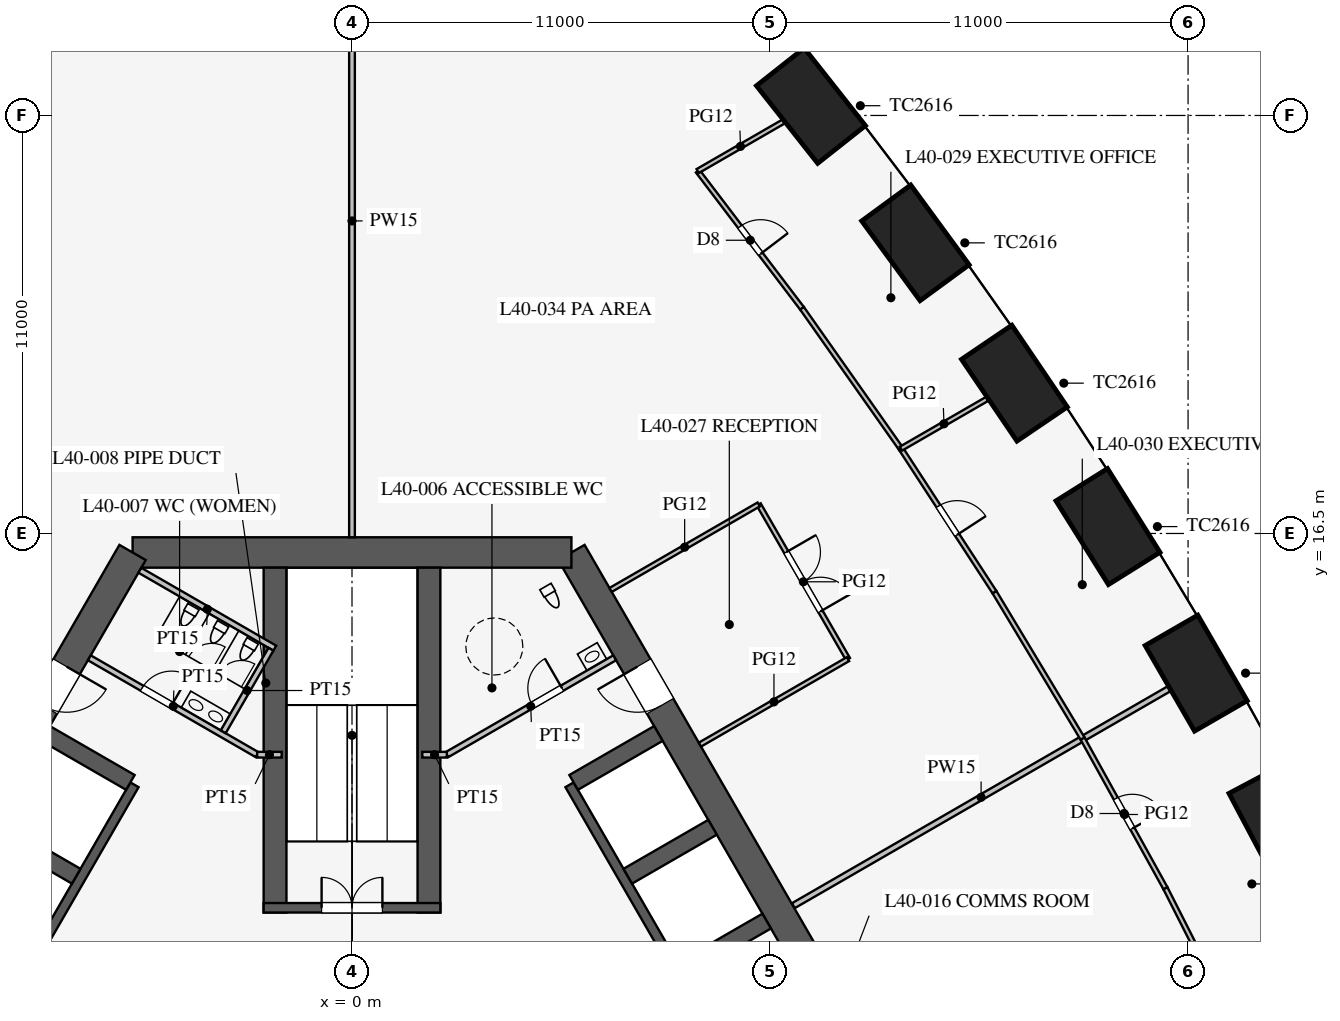
"""IFC4 building model, lengths in metres.
Left out: names, types, materials, properties, quantities, classifications, styles, units other than length and angle.
Written with IfcOpenShell. Run it as: python <this file> out.ifc"""

import sys

from ifc_helpers import new_model, si_unit, direction, frame, frame_2d, origin, origin_2d, place, context, subcontext, project, spatial, rectangle, extrude, element, fill, save


model = new_model("IFC4")
c1 = context("Model", 3, precision=1e-05, world=origin(), true_north=direction((0.0, 1.0)))
c2 = subcontext(c1, "Body", "Model", "MODEL_VIEW")
j1 = project(units=[si_unit("LENGTHUNIT", "METRE"), si_unit("PLANEANGLEUNIT", "RADIAN")], contexts=[c1])
p1 = place(None, origin())
s1 = spatial("IfcSite", under=j1, at=p1, CompositionType="ELEMENT")
p2 = place(p1, origin())
s2 = spatial("IfcBuilding", under=s1, at=p2, CompositionType="ELEMENT")
p3 = place(p2, frame((0.0, 0.0, 174.5)))
s3 = spatial("IfcBuildingStorey", under=s2, at=p3, CompositionType="ELEMENT", Elevation=174.5)
for number, where, z_axis, x_axis in (
    (1, (24.393, 8.887, 0.0), (0.0, 0.0, 1.0), (-0.468, 0.883, 0.0)),
    (2, (22.213, 12.825, 0.0), (0.0, 0.0, 1.0), (-0.5, 0.866, 0.0)),
    (3, (19.893, 16.681, 0.0), (0.0, 0.0, 1.0), (-0.531, 0.847, 0.0)),
    (4, (17.43, 20.456, 0.0), (0.0, 0.0, 1.0), (-0.561, 0.828, 0.0)),
    (5, (14.825, 24.148, 0.0), (0.0, 0.0, 1.0), (-0.591, 0.807, 0.0)),
    (6, (12.077, 27.757, 0.0), (0.0, 0.0, 1.0), (-0.62, 0.785, 0.0)),
):
    element("IfcColumn", number, at=place(p3, frame(where, z_axis=z_axis, x_axis=x_axis)), inside=s3, PredefinedType="COLUMN", context=c2, shape_type="SweptSolid", body=[
        extrude(rectangle(XDim=2.6, YDim=1.6, at=origin_2d()), origin(), (0.0, 0.0, 1.0), 4.2),
    ])
p4 = place(p3, frame((16.743, -3.0, 0.0), z_axis=(0.0, 0.0, 1.0), x_axis=(-0.500002442456, 0.866023993627, 0.0)))
e7 = element("IfcWall", 7, at=p4, inside=s3, PredefinedType="SHEAR", context=c2, shape_type="SweptSolid", body=[
    extrude(rectangle(XDim=21.939, YDim=0.8, at=frame_2d((10.97, 0.0))), origin(), (0.0, 0.0, 1.0), 4.2),
])
p5 = place(p4, frame((17.27, 0.0, 0.0)))
e8 = element("IfcOpeningElement", 8, at=p5, cuts=e7, PredefinedType="OPENING", context=c2, shape_type="SweptSolid", body=[
    extrude(rectangle(XDim=1.2, YDim=2.1, at=frame_2d((0.6, 1.05))), frame((0.0, 0.41, 0.0), z_axis=(0.0, -1.0, 0.0), x_axis=(1.0, 0.0, 0.0)), (0.0, 0.0, 1.0), 0.82),
])
p6 = place(p4, frame((3.47, 0.0, 0.0)))
e9 = element("IfcOpeningElement", 9, at=p6, cuts=e7, PredefinedType="OPENING", context=c2, shape_type="SweptSolid", body=[
    extrude(rectangle(XDim=1.2, YDim=2.1, at=frame_2d((0.6, 1.05))), frame((0.0, 0.41, 0.0), z_axis=(0.0, -1.0, 0.0), x_axis=(1.0, 0.0, 0.0)), (0.0, 0.0, 1.0), 0.82),
])
p7 = place(p3, frame((5.773, 16.0, 0.0), z_axis=(0.0, 0.0, 1.0), x_axis=(-1.0, 0.0, 0.0)))
e10 = element("IfcWall", 10, at=p7, inside=s3, PredefinedType="SHEAR", context=c2, shape_type="SweptSolid", body=[
    extrude(rectangle(XDim=11.547, YDim=0.8, at=frame_2d((5.773, 0.0))), origin(), (0.0, 0.0, 1.0), 4.2),
])
p8 = place(p3, frame((-5.773, 16.0, 0.0), z_axis=(0.0, 0.0, 1.0), x_axis=(-0.500002442456, -0.866023993627, 0.0)))
e11 = element("IfcWall", 11, at=p8, inside=s3, PredefinedType="SHEAR", context=c2, shape_type="SweptSolid", body=[
    extrude(rectangle(XDim=21.939, YDim=0.8, at=frame_2d((10.97, 0.0))), origin(), (0.0, 0.0, 1.0), 4.2),
])
p9 = place(p8, frame((17.27, 0.0, 0.0)))
e12 = element("IfcOpeningElement", 12, at=p9, cuts=e11, PredefinedType="OPENING", context=c2, shape_type="SweptSolid", body=[
    extrude(rectangle(XDim=1.2, YDim=2.1, at=frame_2d((0.6, 1.05))), frame((0.0, 0.41, 0.0), z_axis=(0.0, -1.0, 0.0), x_axis=(1.0, 0.0, 0.0)), (0.0, 0.0, 1.0), 0.82),
])
p10 = place(p8, frame((3.47, 0.0, 0.0)))
e13 = element("IfcOpeningElement", 13, at=p10, cuts=e11, PredefinedType="OPENING", context=c2, shape_type="SweptSolid", body=[
    extrude(rectangle(XDim=1.2, YDim=2.1, at=frame_2d((0.6, 1.05))), frame((0.0, 0.41, 0.0), z_axis=(0.0, -1.0, 0.0), x_axis=(1.0, 0.0, 0.0)), (0.0, 0.0, 1.0), 0.82),
])
p11 = place(p3, frame((11.424, 0.014, 0.0), z_axis=(0.0, 0.0, 1.0), x_axis=(-0.500001763848, 0.866024385424, 0.0)))
e14 = element("IfcWall", 14, at=p11, inside=s3, PredefinedType="SHEAR", context=c2, shape_type="SweptSolid", body=[
    extrude(rectangle(XDim=11.4, YDim=0.25, at=frame_2d((5.7, 0.0))), origin(), (0.0, 0.0, 1.0), 4.2),
])
p12 = place(p11, frame((0.975, 0.0, 0.0)))
e15 = element("IfcOpeningElement", 15, at=p12, cuts=e14, PredefinedType="OPENING", context=c2, shape_type="SweptSolid", body=[
    extrude(rectangle(XDim=0.9, YDim=2.1, at=frame_2d((0.45, 1.05))), frame((0.0, 0.135, 0.0), z_axis=(0.0, -1.0, 0.0), x_axis=(1.0, 0.0, 0.0)), (0.0, 0.0, 1.0), 0.27),
])
p13 = place(p11, frame((3.825, 0.0, 0.0)))
e16 = element("IfcOpeningElement", 16, at=p13, cuts=e14, PredefinedType="OPENING", context=c2, shape_type="SweptSolid", body=[
    extrude(rectangle(XDim=0.9, YDim=2.1, at=frame_2d((0.45, 1.05))), frame((0.0, 0.135, 0.0), z_axis=(0.0, -1.0, 0.0), x_axis=(1.0, 0.0, 0.0)), (0.0, 0.0, 1.0), 0.27),
])
for number, where, z_axis, x_axis in (
    (17, (8.682, 5.012, 0.0), (0.0, 0.0, 1.0), (0.866, 0.5, 0.0)),
    (18, (7.257, 7.481, 0.0), (0.0, 0.0, 1.0), (0.866, 0.5, 0.0)),
):
    element("IfcWall", number, at=place(p3, frame(where, z_axis=z_axis, x_axis=x_axis)), inside=s3, PredefinedType="SHEAR", context=c2, shape_type="SweptSolid", body=[
        extrude(rectangle(XDim=2.575, YDim=0.45, at=frame_2d((1.288, 0.0))), origin(), (0.0, 0.0, 1.0), 4.2),
    ])
p14 = place(p3, frame((5.832, 9.949, 0.0), z_axis=(0.0, 0.0, 1.0), x_axis=(0.866029291668, 0.499993265928, 0.0)))
e19 = element("IfcWall", 19, at=p14, inside=s3, PredefinedType="SHEAR", context=c2, shape_type="SweptSolid", body=[
    extrude(rectangle(XDim=2.575, YDim=0.45, at=frame_2d((1.288, 0.0))), origin(), (0.0, 0.0, 1.0), 4.2),
])
p15 = place(p3, frame((-5.724, 9.886, 0.0), z_axis=(0.0, 0.0, 1.0), x_axis=(-0.500001763848, -0.866024385424, 0.0)))
e20 = element("IfcWall", 20, at=p15, inside=s3, PredefinedType="SHEAR", context=c2, shape_type="SweptSolid", body=[
    extrude(rectangle(XDim=11.4, YDim=0.25, at=frame_2d((5.7, 0.0))), origin(), (0.0, 0.0, 1.0), 4.2),
])
p16 = place(p15, frame((6.525, 0.0, 0.0)))
e21 = element("IfcOpeningElement", 21, at=p16, cuts=e20, PredefinedType="OPENING", context=c2, shape_type="SweptSolid", body=[
    extrude(rectangle(XDim=1.2, YDim=2.2, at=frame_2d((0.6, 1.1))), frame((0.0, 0.135, 0.0), z_axis=(0.0, -1.0, 0.0), x_axis=(1.0, 0.0, 0.0)), (0.0, 0.0, 1.0), 0.27),
])
p17 = place(p15, frame((9.375, 0.0, 0.0)))
e22 = element("IfcOpeningElement", 22, at=p17, cuts=e20, PredefinedType="OPENING", context=c2, shape_type="SweptSolid", body=[
    extrude(rectangle(XDim=1.2, YDim=2.2, at=frame_2d((0.6, 1.1))), frame((0.0, 0.135, 0.0), z_axis=(0.0, -1.0, 0.0), x_axis=(1.0, 0.0, 0.0)), (0.0, 0.0, 1.0), 0.27),
])
p18 = place(p3, frame((-5.832, 9.949, 0.0), z_axis=(0.0, 0.0, 1.0), x_axis=(-0.866029291668, 0.499993265928, 0.0)))
e23 = element("IfcWall", 23, at=p18, inside=s3, PredefinedType="SHEAR", context=c2, shape_type="SweptSolid", body=[
    extrude(rectangle(XDim=2.575, YDim=0.45, at=frame_2d((1.288, 0.0))), origin(), (0.0, 0.0, 1.0), 4.2),
])
p19 = place(p3, frame((-7.257, 7.481, 0.0), z_axis=(0.0, 0.0, 1.0), x_axis=(-0.866046643894, 0.499963209246, 0.0)))
e24 = element("IfcWall", 24, at=p19, inside=s3, PredefinedType="SHEAR", context=c2, shape_type="SweptSolid", body=[
    extrude(rectangle(XDim=2.575, YDim=0.45, at=frame_2d((1.288, 0.0))), origin(), (0.0, 0.0, 1.0), 4.2),
])
for number, where, z_axis, x_axis in (
    (25, (2.025, 6.525, 0.0), (0.0, 0.0, 1.0), (0.0, 1.0, 0.0)),
    (26, (-2.025, 6.525, 0.0), (0.0, 0.0, 1.0), (0.0, 1.0, 0.0)),
):
    element("IfcWall", number, at=place(p3, frame(where, z_axis=z_axis, x_axis=x_axis)), inside=s3, PredefinedType="SHEAR", context=c2, shape_type="SweptSolid", body=[
        extrude(rectangle(XDim=9.075, YDim=0.6, at=frame_2d((4.538, 0.0))), origin(), (0.0, 0.0, 1.0), 4.2),
    ])
p20 = place(p3, frame((2.325, 6.65, 0.0), z_axis=(0.0, 0.0, 1.0), x_axis=(-1.0, 0.0, 0.0)))
e27 = element("IfcWall", 27, at=p20, inside=s3, PredefinedType="SHEAR", context=c2, shape_type="SweptSolid", body=[
    extrude(rectangle(XDim=4.65, YDim=0.25, at=frame_2d((2.325, 0.0))), origin(), (0.0, 0.0, 1.0), 4.2),
])
p21 = place(p20, frame((1.525, 0.0, 0.0)))
e28 = element("IfcOpeningElement", 28, at=p21, cuts=e27, PredefinedType="OPENING", context=c2, shape_type="SweptSolid", body=[
    extrude(rectangle(XDim=1.6, YDim=2.1, at=frame_2d((0.8, 1.05))), frame((0.0, 0.135, 0.0), z_axis=(0.0, -1.0, 0.0), x_axis=(1.0, 0.0, 0.0)), (0.0, 0.0, 1.0), 0.27),
])
p22 = place(p3, frame((2.495, 10.678, 0.0), z_axis=(0.0, 0.0, 1.0), x_axis=(0.86602216432, 0.500005610874, 0.0)))
e29 = element("IfcWall", 29, at=p22, inside=s3, PredefinedType="PARTITIONING", context=c2, shape_type="SweptSolid", body=[
    extrude(rectangle(XDim=5.1, YDim=0.15, at=frame_2d((2.55, 0.0))), origin(), (0.0, 0.0, 1.0), 3.95),
])
p23 = place(p22, frame((2.6, 0.0, 0.0)))
e30 = element("IfcOpeningElement", 30, at=p23, cuts=e29, PredefinedType="OPENING", context=c2, shape_type="SweptSolid", body=[
    extrude(rectangle(XDim=0.9, YDim=2.1, at=frame_2d((0.45, 1.05))), frame((0.0, 0.085, 0.0), z_axis=(0.0, -1.0, 0.0), x_axis=(1.0, 0.0, 0.0)), (0.0, 0.0, 1.0), 0.17),
])
p24 = place(p3, frame((-2.495, 10.678, 0.0), z_axis=(0.0, 0.0, 1.0), x_axis=(-0.86602216432, 0.500005610874, 0.0)))
e31 = element("IfcWall", 31, at=p24, inside=s3, PredefinedType="PARTITIONING", context=c2, shape_type="SweptSolid", body=[
    extrude(rectangle(XDim=5.1, YDim=0.15, at=frame_2d((2.55, 0.0))), origin(), (0.0, 0.0, 1.0), 3.95),
])
p25 = place(p24, frame((2.6, 0.0, 0.0)))
e32 = element("IfcOpeningElement", 32, at=p25, cuts=e31, PredefinedType="OPENING", context=c2, shape_type="SweptSolid", body=[
    extrude(rectangle(XDim=0.9, YDim=2.1, at=frame_2d((0.45, 1.05))), frame((0.0, 0.085, 0.0), z_axis=(0.0, -1.0, 0.0), x_axis=(1.0, 0.0, 0.0)), (0.0, 0.0, 1.0), 0.17),
])
for number, where, z_axis, x_axis in (
    (33, (2.495, 10.678, 0.0), (0.0, 0.0, 1.0), (-1.0, 0.0, 0.0)),
    (34, (-2.495, 10.678, 0.0), (0.0, 0.0, 1.0), (1.0, 0.0, 0.0)),
):
    element("IfcWall", number, at=place(p3, frame(where, z_axis=z_axis, x_axis=x_axis)), inside=s3, PredefinedType="PARTITIONING", context=c2, shape_type="SweptSolid", body=[
        extrude(rectangle(XDim=0.645, YDim=0.15, at=frame_2d((0.323, 0.0))), origin(), (0.0, 0.0, 1.0), 3.95),
    ])
p26 = place(p3, frame((-2.031, 13.482, 0.0), z_axis=(0.0, 0.0, 1.0), x_axis=(-0.866050731258, 0.499956128963, 0.0)))
e35 = element("IfcWall", 35, at=p26, inside=s3, PredefinedType="PARTITIONING", context=c2, shape_type="SweptSolid", body=[
    extrude(rectangle(XDim=4.1, YDim=0.15, at=frame_2d((2.05, 0.0))), origin(), (0.0, 0.0, 1.0), 3.95),
])
p27 = place(p3, frame((-3.389, 11.281, 0.0), z_axis=(0.0, 0.0, 1.0), x_axis=(0.499989096993, 0.866031698547, 0.0)))
e36 = element("IfcWall", 36, at=p27, inside=s3, PredefinedType="PARTITIONING", context=c2, shape_type="SweptSolid", body=[
    extrude(rectangle(XDim=2.51, YDim=0.15, at=frame_2d((1.255, 0.0))), origin(), (0.0, 0.0, 1.0), 3.95),
])
p28 = place(p3, frame((0.0, 16.4, 0.0), z_axis=(0.0, 0.0, 1.0), x_axis=(0.0, 1.0, 0.0)))
e37 = element("IfcWall", 37, at=p28, inside=s3, PredefinedType="PARTITIONING", context=c2, shape_type="SweptSolid", body=[
    extrude(rectangle(XDim=16.65, YDim=0.15, at=frame_2d((8.325, 0.0))), origin(), (0.0, 0.0, 1.0), 1.95),
])
p29 = place(p3, frame((11.613, 6.705, 0.0), z_axis=(0.0, 0.0, 1.0), x_axis=(0.866026306654, 0.499998436182, 0.0)))
e38 = element("IfcWall", 38, at=p29, inside=s3, PredefinedType="PARTITIONING", context=c2, shape_type="SweptSolid", body=[
    extrude(rectangle(XDim=11.41, YDim=0.15, at=frame_2d((5.705, 0.0))), origin(), (0.0, 0.0, 1.0), 2.15),
])
p30 = place(p3, frame((13.052, 13.194, 0.0), z_axis=(0.0, 0.0, 1.0), x_axis=(-0.499977259774, 0.866038532462, 0.0)))
e39 = element("IfcWall", 39, at=p30, inside=s3, PredefinedType="PARTITIONING", context=c2, shape_type="SweptSolid", body=[
    extrude(rectangle(XDim=4.7, YDim=0.12, at=frame_2d((2.35, 0.0))), origin(), (0.0, 0.0, 1.0), 2.9),
])
p31 = place(p30, frame((1.45, 0.0, 0.15)))
e40 = element("IfcOpeningElement", 40, at=p31, cuts=e39, PredefinedType="OPENING", context=c2, shape_type="SweptSolid", body=[
    extrude(rectangle(XDim=1.8, YDim=2.1, at=frame_2d((0.9, 1.05))), frame((0.0, 0.07, 0.0), z_axis=(0.0, -1.0, 0.0), x_axis=(1.0, 0.0, 0.0)), (0.0, 0.0, 1.0), 0.14),
])
p32 = place(p3, frame((9.155, 10.944, 0.0), z_axis=(0.0, 0.0, 1.0), x_axis=(0.866017533419, 0.500013631625, 0.0)))
e41 = element("IfcWall", 41, at=p32, inside=s3, PredefinedType="PARTITIONING", context=c2, shape_type="SweptSolid", body=[
    extrude(rectangle(XDim=4.5, YDim=0.12, at=frame_2d((2.25, 0.0))), origin(), (0.0, 0.0, 1.0), 2.9),
])
p33 = place(p3, frame((6.805, 15.014, 0.0), z_axis=(0.0, 0.0, 1.0), x_axis=(0.866031096941, 0.499990139034, 0.0)))
e42 = element("IfcWall", 42, at=p33, inside=s3, PredefinedType="PARTITIONING", context=c2, shape_type="SweptSolid", body=[
    extrude(rectangle(XDim=4.5, YDim=0.12, at=frame_2d((2.25, 0.0))), origin(), (0.0, 0.0, 1.0), 2.9),
])
p34 = place(p3, frame((19.226, 11.1, 0.0), z_axis=(0.0, 0.0, 1.0), x_axis=(-0.515548366618, 0.856860479703, 0.0)))
e43 = element("IfcWall", 43, at=p34, inside=s3, PredefinedType="PARTITIONING", context=c2, shape_type="SweptSolid", body=[
    extrude(rectangle(XDim=4.501, YDim=0.12, at=frame_2d((2.25, 0.0))), origin(), (0.0, 0.0, 1.0), 2.9),
])
p35 = place(p3, frame((11.842, 22.425, 0.0), z_axis=(0.0, 0.0, 1.0), x_axis=(-0.605240194184, 0.796042905467, 0.0)))
e44 = element("IfcWall", 44, at=p35, inside=s3, PredefinedType="PARTITIONING", context=c2, shape_type="SweptSolid", body=[
    extrude(rectangle(XDim=4.536, YDim=0.12, at=frame_2d((2.268, 0.0))), origin(), (0.0, 0.0, 1.0), 2.9),
])
p36 = place(p35, frame((1.8, 0.0, 0.15)))
e45 = element("IfcOpeningElement", 45, at=p36, cuts=e44, PredefinedType="OPENING", context=c2, shape_type="SweptSolid", body=[
    extrude(rectangle(XDim=0.9, YDim=2.1, at=frame_2d((0.45, 1.05))), frame((0.0, 0.07, 0.0), z_axis=(0.0, -1.0, 0.0), x_axis=(1.0, 0.0, 0.0)), (0.0, 0.0, 1.0), 0.14),
])
p37 = place(p3, frame((16.905, 14.956, 0.0), z_axis=(0.0, 0.0, 1.0), x_axis=(-0.546069464151, 0.837739900161, 0.0)))
e46 = element("IfcWall", 46, at=p37, inside=s3, PredefinedType="PARTITIONING", context=c2, shape_type="SweptSolid", body=[
    extrude(rectangle(XDim=4.507, YDim=0.12, at=frame_2d((2.253, 0.0))), origin(), (0.0, 0.0, 1.0), 2.9),
])
p38 = place(p37, frame((1.8, 0.0, 0.15)))
e47 = element("IfcOpeningElement", 47, at=p38, cuts=e46, PredefinedType="OPENING", context=c2, shape_type="SweptSolid", body=[
    extrude(rectangle(XDim=0.9, YDim=2.1, at=frame_2d((0.45, 1.05))), frame((0.0, 0.07, 0.0), z_axis=(0.0, -1.0, 0.0), x_axis=(1.0, 0.0, 0.0)), (0.0, 0.0, 1.0), 0.14),
])
p39 = place(p3, frame((14.444, 18.732, 0.0), z_axis=(0.0, 0.0, 1.0), x_axis=(-0.576023283708, 0.817433285734, 0.0)))
e48 = element("IfcWall", 48, at=p39, inside=s3, PredefinedType="PARTITIONING", context=c2, shape_type="SweptSolid", body=[
    extrude(rectangle(XDim=4.519, YDim=0.12, at=frame_2d((2.259, 0.0))), origin(), (0.0, 0.0, 1.0), 2.9),
])
p40 = place(p3, frame((21.405, 7.162, 0.0), z_axis=(0.0, 0.0, 1.0), x_axis=(-0.484292898211, 0.874905931368, 0.0)))
e49 = element("IfcWall", 49, at=p40, inside=s3, PredefinedType="PARTITIONING", context=c2, shape_type="SweptSolid", body=[
    extrude(rectangle(XDim=4.501, YDim=0.12, at=frame_2d((2.25, 0.0))), origin(), (0.0, 0.0, 1.0), 2.9),
])
p41 = place(p40, frame((1.8, 0.0, 0.15)))
e50 = element("IfcOpeningElement", 50, at=p41, cuts=e49, PredefinedType="OPENING", context=c2, shape_type="SweptSolid", body=[
    extrude(rectangle(XDim=0.9, YDim=2.1, at=frame_2d((0.45, 1.05))), frame((0.0, 0.07, 0.0), z_axis=(0.0, -1.0, 0.0), x_axis=(1.0, 0.0, 0.0)), (0.0, 0.0, 1.0), 0.14),
])
p42 = place(p3, frame((23.444, 3.143, 0.0), z_axis=(0.0, 0.0, 1.0), x_axis=(-0.452471679136, 0.891778772779, 0.0)))
e51 = element("IfcWall", 51, at=p42, inside=s3, PredefinedType="PARTITIONING", context=c2, shape_type="SweptSolid", body=[
    extrude(rectangle(XDim=4.507, YDim=0.12, at=frame_2d((2.253, 0.0))), origin(), (0.0, 0.0, 1.0), 2.9),
])
p43 = place(p3, frame((9.096, 26.036, 0.0), z_axis=(0.0, 0.0, 1.0), x_axis=(0.866012205188, 0.500022859943, 0.0)))
e52 = element("IfcWall", 52, at=p43, inside=s3, PredefinedType="PARTITIONING", context=c2, shape_type="SweptSolid", body=[
    extrude(rectangle(XDim=2.603, YDim=0.12, at=frame_2d((1.302, 0.0))), origin(), (0.0, 0.0, 1.0), 2.15),
])
p44 = place(p3, frame((14.444, 18.732, 0.0), z_axis=(0.0, 0.0, 1.0), x_axis=(0.866011491631, 0.500024095782, 0.0)))
e53 = element("IfcWall", 53, at=p44, inside=s3, PredefinedType="PARTITIONING", context=c2, shape_type="SweptSolid", body=[
    extrude(rectangle(XDim=2.615, YDim=0.12, at=frame_2d((1.308, 0.0))), origin(), (0.0, 0.0, 1.0), 2.35),
])
p45 = place(p23, origin())
e54 = element("IfcDoor", 54, at=p45, inside=s3, OperationType="SINGLE_SWING_RIGHT", PredefinedType="DOOR", context=c2, shape_type="SweptSolid", body=[
    extrude(rectangle(XDim=0.9, YDim=2.1, at=frame_2d((0.45, 1.05))), frame((0.0, 0.025, 0.0), z_axis=(0.0, -1.0, 0.0), x_axis=(1.0, 0.0, 0.0)), (0.0, 0.0, 1.0), 0.05),
])
fill(e30, e54)
p46 = place(p25, frame((0.9, 0.0, 0.0), z_axis=(0.0, 0.0, 1.0), x_axis=(-1.0, 0.0, 0.0)))
e55 = element("IfcDoor", 55, at=p46, inside=s3, OperationType="SINGLE_SWING_RIGHT", PredefinedType="DOOR", context=c2, shape_type="SweptSolid", body=[
    extrude(rectangle(XDim=0.9, YDim=2.1, at=frame_2d((0.45, 1.05))), frame((0.0, 0.025, 0.0), z_axis=(0.0, -1.0, 0.0), x_axis=(1.0, 0.0, 0.0)), (0.0, 0.0, 1.0), 0.05),
])
fill(e32, e55)
p47 = place(p21, frame((1.6, 0.0, 0.0), z_axis=(0.0, 0.0, 1.0), x_axis=(-1.0, 0.0, 0.0)))
e56 = element("IfcDoor", 56, at=p47, inside=s3, OperationType="DOUBLE_DOOR_SINGLE_SWING", PredefinedType="DOOR", context=c2, shape_type="SweptSolid", body=[
    extrude(rectangle(XDim=1.6, YDim=2.1, at=frame_2d((0.8, 1.05))), frame((0.0, 0.025, 0.0), z_axis=(0.0, -1.0, 0.0), x_axis=(1.0, 0.0, 0.0)), (0.0, 0.0, 1.0), 0.05),
])
fill(e28, e56)
p48 = place(p5, origin())
e57 = element("IfcDoor", 57, at=p48, inside=s3, OperationType="SINGLE_SWING_RIGHT", PredefinedType="DOOR", context=c2, shape_type="SweptSolid", body=[
    extrude(rectangle(XDim=1.2, YDim=2.1, at=frame_2d((0.6, 1.05))), frame((0.0, 0.025, 0.0), z_axis=(0.0, -1.0, 0.0), x_axis=(1.0, 0.0, 0.0)), (0.0, 0.0, 1.0), 0.05),
])
fill(e8, e57)
p49 = place(p10, origin())
e58 = element("IfcDoor", 58, at=p49, inside=s3, OperationType="SINGLE_SWING_LEFT", PredefinedType="DOOR", context=c2, shape_type="SweptSolid", body=[
    extrude(rectangle(XDim=1.2, YDim=2.1, at=frame_2d((0.6, 1.05))), frame((0.0, 0.025, 0.0), z_axis=(0.0, -1.0, 0.0), x_axis=(1.0, 0.0, 0.0)), (0.0, 0.0, 1.0), 0.05),
])
fill(e13, e58)
p50 = place(p31, frame((1.8, 0.0, 0.0), z_axis=(0.0, 0.0, 1.0), x_axis=(-1.0, 0.0, 0.0)))
e59 = element("IfcDoor", 59, at=p50, inside=s3, OperationType="DOUBLE_DOOR_SINGLE_SWING", PredefinedType="DOOR", context=c2, shape_type="SweptSolid", body=[
    extrude(rectangle(XDim=1.8, YDim=2.1, at=frame_2d((0.9, 1.05))), frame((0.0, 0.025, 0.0), z_axis=(0.0, -1.0, 0.0), x_axis=(1.0, 0.0, 0.0)), (0.0, 0.0, 1.0), 0.05),
])
fill(e40, e59)
p51 = place(p36, frame((0.9, 0.0, 0.0), z_axis=(0.0, 0.0, 1.0), x_axis=(-1.0, 0.0, 0.0)))
e60 = element("IfcDoor", 60, at=p51, inside=s3, OperationType="SINGLE_SWING_RIGHT", PredefinedType="DOOR", context=c2, shape_type="SweptSolid", body=[
    extrude(rectangle(XDim=0.9, YDim=2.1, at=frame_2d((0.45, 1.05))), frame((0.0, 0.025, 0.0), z_axis=(0.0, -1.0, 0.0), x_axis=(1.0, 0.0, 0.0)), (0.0, 0.0, 1.0), 0.05),
])
fill(e45, e60)
p52 = place(p38, frame((0.9, 0.0, 0.0), z_axis=(0.0, 0.0, 1.0), x_axis=(-1.0, 0.0, 0.0)))
e61 = element("IfcDoor", 61, at=p52, inside=s3, OperationType="SINGLE_SWING_RIGHT", PredefinedType="DOOR", context=c2, shape_type="SweptSolid", body=[
    extrude(rectangle(XDim=0.9, YDim=2.1, at=frame_2d((0.45, 1.05))), frame((0.0, 0.025, 0.0), z_axis=(0.0, -1.0, 0.0), x_axis=(1.0, 0.0, 0.0)), (0.0, 0.0, 1.0), 0.05),
])
fill(e47, e61)
p53 = place(p41, frame((0.9, 0.0, 0.0), z_axis=(0.0, 0.0, 1.0), x_axis=(-1.0, 0.0, 0.0)))
e62 = element("IfcDoor", 62, at=p53, inside=s3, OperationType="SINGLE_SWING_RIGHT", PredefinedType="DOOR", context=c2, shape_type="SweptSolid", body=[
    extrude(rectangle(XDim=0.9, YDim=2.1, at=frame_2d((0.45, 1.05))), frame((0.0, 0.025, 0.0), z_axis=(0.0, -1.0, 0.0), x_axis=(1.0, 0.0, 0.0)), (0.0, 0.0, 1.0), 0.05),
])
fill(e50, e62)
save(model, sys.argv[1])
